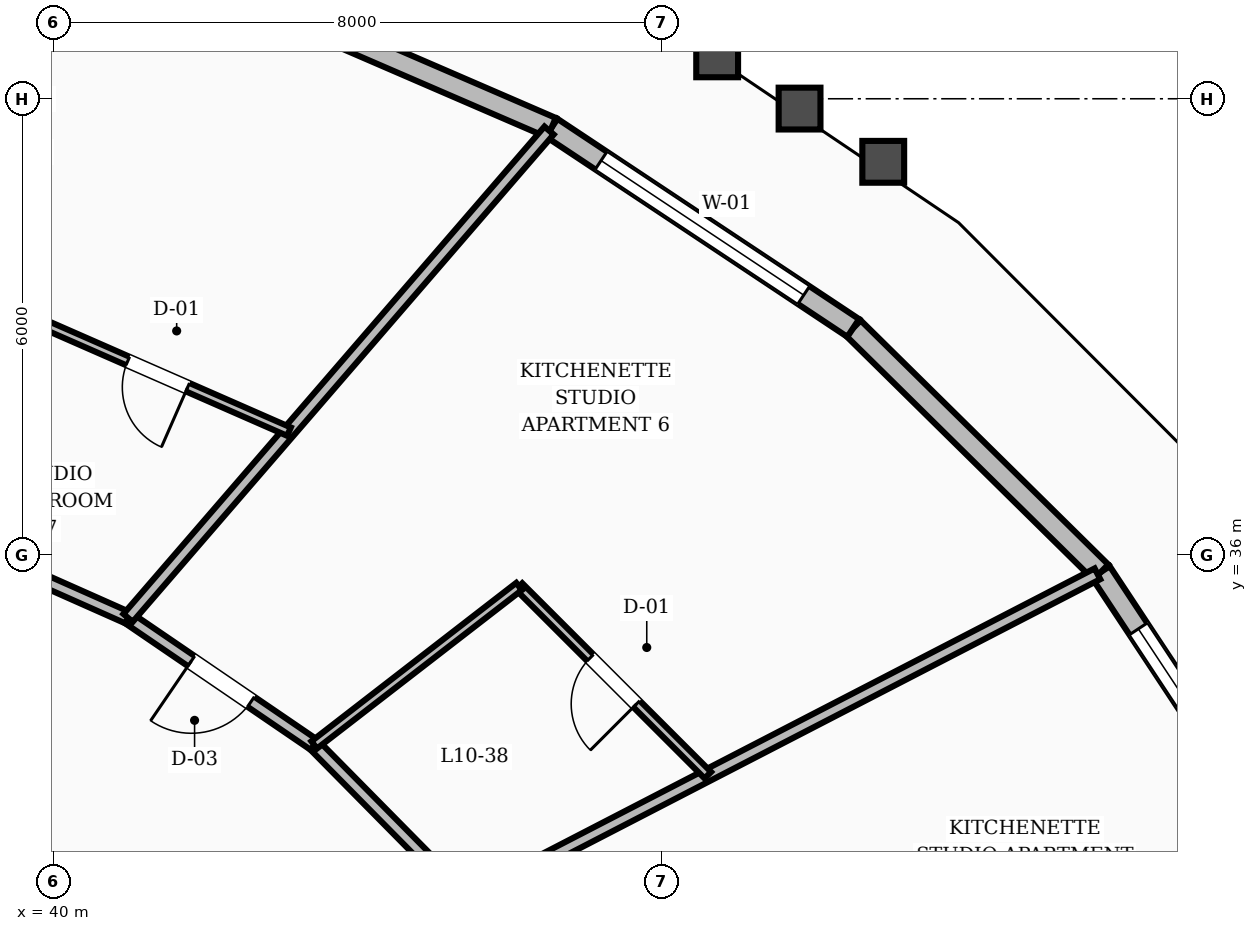
"""IFC4 building model, lengths in metres.
Left out: names, types, materials, properties, quantities, classifications, styles, units other than length and angle.
Written with IfcOpenShell. Run it as: python <this file> out.ifc"""

import sys

from ifc_helpers import new_model, si_unit, direction, frame, frame_2d, origin, place, context, subcontext, project, spatial, rectangle, extrude, element, fill, save


model = new_model("IFC4")
c1 = context("Model", 3, precision=1e-05, world=origin(), true_north=direction((0.0, 1.0)))
c2 = subcontext(c1, "Body", "Model", "MODEL_VIEW")
j1 = project(units=[si_unit("LENGTHUNIT", "METRE"), si_unit("PLANEANGLEUNIT", "RADIAN")], contexts=[c1])
p1 = place(None, origin())
s1 = spatial("IfcSite", under=j1, at=p1, CompositionType="ELEMENT")
p2 = place(p1, origin())
s2 = spatial("IfcBuilding", under=s1, at=p2, CompositionType="ELEMENT")
p3 = place(p2, frame((0.0, 0.0, 44.8)))
s3 = spatial("IfcBuildingStorey", under=s2, at=p3, CompositionType="ELEMENT", Elevation=44.8)
p4 = place(p3, frame((56.197, 32.109, 0.0), z_axis=(0.0, 0.0, 1.0), x_axis=(-0.551192292831, 0.834378245356, 0.0)))
e1 = element("IfcWall", 1, at=p4, inside=s3, PredefinedType="STANDARD", context=c2, shape_type="SweptSolid", body=[
    extrude(rectangle(XDim=4.391, YDim=0.28, at=frame_2d((2.195, 0.0))), origin(), (0.0, 0.0, 1.0), 2.65),
])
p5 = place(p4, frame((0.896, 0.0, 0.8)))
e2 = element("IfcOpeningElement", 2, at=p5, cuts=e1, PredefinedType="OPENING", context=c2, shape_type="SweptSolid", body=[
    extrude(rectangle(XDim=2.6, YDim=1.65, at=frame_2d((1.3, 0.825))), frame((0.0, 0.15, 0.0), z_axis=(0.0, -1.0, 0.0), x_axis=(1.0, 0.0, 0.0)), (0.0, 0.0, 1.0), 0.3),
])
p6 = place(p3, frame((53.777, 35.773, 0.0), z_axis=(0.0, 0.0, 1.0), x_axis=(-0.712106444973, 0.702071514184, 0.0)))
e3 = element("IfcWall", 3, at=p6, inside=s3, PredefinedType="STANDARD", context=c2, shape_type="SweptSolid", body=[
    extrude(rectangle(XDim=4.574, YDim=0.28, at=frame_2d((2.287, 0.0))), origin(), (0.0, 0.0, 1.0), 2.65),
])
p7 = place(p3, frame((50.52, 38.984, 0.0), z_axis=(0.0, 0.0, 1.0), x_axis=(-0.833089497156, 0.55313821937, 0.0)))
e4 = element("IfcWall", 4, at=p7, inside=s3, PredefinedType="STANDARD", context=c2, shape_type="SweptSolid", body=[
    extrude(rectangle(XDim=4.764, YDim=0.28, at=frame_2d((2.382, 0.0))), origin(), (0.0, 0.0, 1.0), 2.65),
])
p8 = place(p7, frame((0.782, 0.0, 0.8)))
e5 = element("IfcOpeningElement", 5, at=p8, cuts=e4, PredefinedType="OPENING", context=c2, shape_type="SweptSolid", body=[
    extrude(rectangle(XDim=3.2, YDim=1.65, at=frame_2d((1.6, 0.825))), frame((0.0, 0.15, 0.0), z_axis=(0.0, -1.0, 0.0), x_axis=(1.0, 0.0, 0.0)), (0.0, 0.0, 1.0), 0.3),
])
p9 = place(p3, frame((46.551, 41.619, 0.0), z_axis=(0.0, 0.0, 1.0), x_axis=(-0.917844853987, 0.396939320312, 0.0)))
e6 = element("IfcWall", 6, at=p9, inside=s3, PredefinedType="STANDARD", context=c2, shape_type="SweptSolid", body=[
    extrude(rectangle(XDim=4.933, YDim=0.28, at=frame_2d((2.467, 0.0))), origin(), (0.0, 0.0, 1.0), 2.65),
])
p10 = place(p3, frame((45.438, 31.463, 0.0), z_axis=(0.0, 0.0, 1.0), x_axis=(-0.702569520063, 0.711615113301, 0.0)))
e7 = element("IfcWall", 7, at=p10, inside=s3, PredefinedType="SOLIDWALL", context=c2, shape_type="SweptSolid", body=[
    extrude(rectangle(XDim=2.861, YDim=0.16, at=frame_2d((1.43, 0.0))), origin(), (0.0, 0.0, 1.0), 2.61),
])
p11 = place(p3, frame((43.428, 33.499, 0.0), z_axis=(0.0, 0.0, 1.0), x_axis=(-0.826112340767, 0.563505457323, 0.0)))
e8 = element("IfcWall", 8, at=p11, inside=s3, PredefinedType="SOLIDWALL", context=c2, shape_type="SweptSolid", body=[
    extrude(rectangle(XDim=2.965, YDim=0.16, at=frame_2d((1.482, 0.0))), origin(), (0.0, 0.0, 1.0), 2.61),
])
p12 = place(p11, frame((1.007, 0.0, 0.0)))
e9 = element("IfcOpeningElement", 9, at=p12, cuts=e8, PredefinedType="OPENING", context=c2, shape_type="SweptSolid", body=[
    extrude(rectangle(XDim=0.95, YDim=2.1, at=frame_2d((0.475, 1.05))), frame((0.0, 0.09, 0.0), z_axis=(0.0, -1.0, 0.0), x_axis=(1.0, 0.0, 0.0)), (0.0, 0.0, 1.0), 0.18),
])
p13 = place(p3, frame((40.979, 35.17, 0.0), z_axis=(0.0, 0.0, 1.0), x_axis=(-0.913860932409, 0.406027334321, 0.0)))
e10 = element("IfcWall", 10, at=p13, inside=s3, PredefinedType="SOLIDWALL", context=c2, shape_type="SweptSolid", body=[
    extrude(rectangle(XDim=3.058, YDim=0.16, at=frame_2d((1.529, 0.0))), origin(), (0.0, 0.0, 1.0), 2.61),
])
p14 = place(p3, frame((45.438, 31.463, 0.0), z_axis=(0.0, 0.0, 1.0), x_axis=(0.888369559671, 0.459129094537, 0.0)))
e11 = element("IfcWall", 11, at=p14, inside=s3, PredefinedType="SOLIDWALL", context=c2, shape_type="SweptSolid", body=[
    extrude(rectangle(XDim=9.336, YDim=0.16, at=frame_2d((4.668, 0.0))), origin(), (0.0, 0.0, 1.0), 2.61),
])
p15 = place(p3, frame((48.607, 33.101, 0.0), z_axis=(0.0, 0.0, 1.0), x_axis=(-0.707315315982, 0.706898184874, 0.0)))
e12 = element("IfcWall", 12, at=p15, inside=s3, PredefinedType="PARTITIONING", context=c2, shape_type="SweptSolid", body=[
    extrude(rectangle(XDim=3.512, YDim=0.12, at=frame_2d((1.756, 0.0))), origin(), (0.0, 0.0, 1.0), 2.61),
])
p16 = place(p15, frame((1.326, 0.0, 0.0)))
e13 = element("IfcOpeningElement", 13, at=p16, cuts=e12, PredefinedType="OPENING", context=c2, shape_type="SweptSolid", body=[
    extrude(rectangle(XDim=0.86, YDim=2.1, at=frame_2d((0.43, 1.05))), frame((0.0, 0.07, 0.0), z_axis=(0.0, -1.0, 0.0), x_axis=(1.0, 0.0, 0.0)), (0.0, 0.0, 1.0), 0.14),
])
p17 = place(p3, frame((43.428, 33.499, 0.0), z_axis=(0.0, 0.0, 1.0), x_axis=(0.79102015288, 0.611790092873, 0.0)))
e14 = element("IfcWall", 14, at=p17, inside=s3, PredefinedType="PARTITIONING", context=c2, shape_type="SweptSolid", body=[
    extrude(rectangle(XDim=3.407, YDim=0.12, at=frame_2d((1.703, 0.0))), origin(), (0.0, 0.0, 1.0), 2.61),
])
p18 = place(p3, frame((40.979, 35.17, 0.0), z_axis=(0.0, 0.0, 1.0), x_axis=(0.653724138874, 0.756732945136, 0.0)))
e15 = element("IfcWall", 15, at=p18, inside=s3, PredefinedType="SOLIDWALL", context=c2, shape_type="SweptSolid", body=[
    extrude(rectangle(XDim=8.473, YDim=0.16, at=frame_2d((4.237, 0.0))), origin(), (0.0, 0.0, 1.0), 2.61),
])
p19 = place(p3, frame((43.096, 37.621, 0.0), z_axis=(0.0, 0.0, 1.0), x_axis=(-0.915861325475, 0.401494747786, 0.0)))
e16 = element("IfcWall", 16, at=p19, inside=s3, PredefinedType="PARTITIONING", context=c2, shape_type="SweptSolid", body=[
    extrude(rectangle(XDim=3.77, YDim=0.12, at=frame_2d((1.885, 0.0))), origin(), (0.0, 0.0, 1.0), 2.61),
])
p20 = place(p19, frame((1.455, 0.0, 0.0)))
e17 = element("IfcOpeningElement", 17, at=p20, cuts=e16, PredefinedType="OPENING", context=c2, shape_type="SweptSolid", body=[
    extrude(rectangle(XDim=0.86, YDim=2.1, at=frame_2d((0.43, 1.05))), frame((0.0, 0.07, 0.0), z_axis=(0.0, -1.0, 0.0), x_axis=(1.0, 0.0, 0.0)), (0.0, 0.0, 1.0), 0.14),
])
p21 = place(p5, origin())
e18 = element("IfcWindow", 18, at=p21, inside=s3, PartitioningType="SINGLE_PANEL", PredefinedType="WINDOW", context=c2, shape_type="SweptSolid", body=[
    extrude(rectangle(XDim=2.6, YDim=1.65, at=frame_2d((1.3, 0.825))), frame((0.0, 0.03, 0.0), z_axis=(0.0, -1.0, 0.0), x_axis=(1.0, 0.0, 0.0)), (0.0, 0.0, 1.0), 0.06),
])
fill(e2, e18)
p22 = place(p8, origin())
e19 = element("IfcWindow", 19, at=p22, inside=s3, PartitioningType="SINGLE_PANEL", PredefinedType="WINDOW", context=c2, shape_type="SweptSolid", body=[
    extrude(rectangle(XDim=3.2, YDim=1.65, at=frame_2d((1.6, 0.825))), frame((0.0, 0.03, 0.0), z_axis=(0.0, -1.0, 0.0), x_axis=(1.0, 0.0, 0.0)), (0.0, 0.0, 1.0), 0.06),
])
fill(e5, e19)
p23 = place(p16, origin())
e20 = element("IfcDoor", 20, at=p23, inside=s3, OperationType="SINGLE_SWING_LEFT", PredefinedType="DOOR", context=c2, shape_type="SweptSolid", body=[
    extrude(rectangle(XDim=0.86, YDim=2.1, at=frame_2d((0.43, 1.05))), frame((0.0, 0.025, 0.0), z_axis=(0.0, -1.0, 0.0), x_axis=(1.0, 0.0, 0.0)), (0.0, 0.0, 1.0), 0.05),
])
fill(e13, e20)
p24 = place(p12, origin())
e21 = element("IfcDoor", 21, at=p24, inside=s3, OperationType="SINGLE_SWING_RIGHT", PredefinedType="DOOR", context=c2, shape_type="SweptSolid", body=[
    extrude(rectangle(XDim=0.95, YDim=2.1, at=frame_2d((0.475, 1.05))), frame((0.0, 0.025, 0.0), z_axis=(0.0, -1.0, 0.0), x_axis=(1.0, 0.0, 0.0)), (0.0, 0.0, 1.0), 0.05),
])
fill(e9, e21)
p25 = place(p20, origin())
e22 = element("IfcDoor", 22, at=p25, inside=s3, OperationType="SINGLE_SWING_LEFT", PredefinedType="DOOR", context=c2, shape_type="SweptSolid", body=[
    extrude(rectangle(XDim=0.86, YDim=2.1, at=frame_2d((0.43, 1.05))), frame((0.0, 0.025, 0.0), z_axis=(0.0, -1.0, 0.0), x_axis=(1.0, 0.0, 0.0)), (0.0, 0.0, 1.0), 0.05),
])
fill(e17, e22)
save(model, sys.argv[1])
